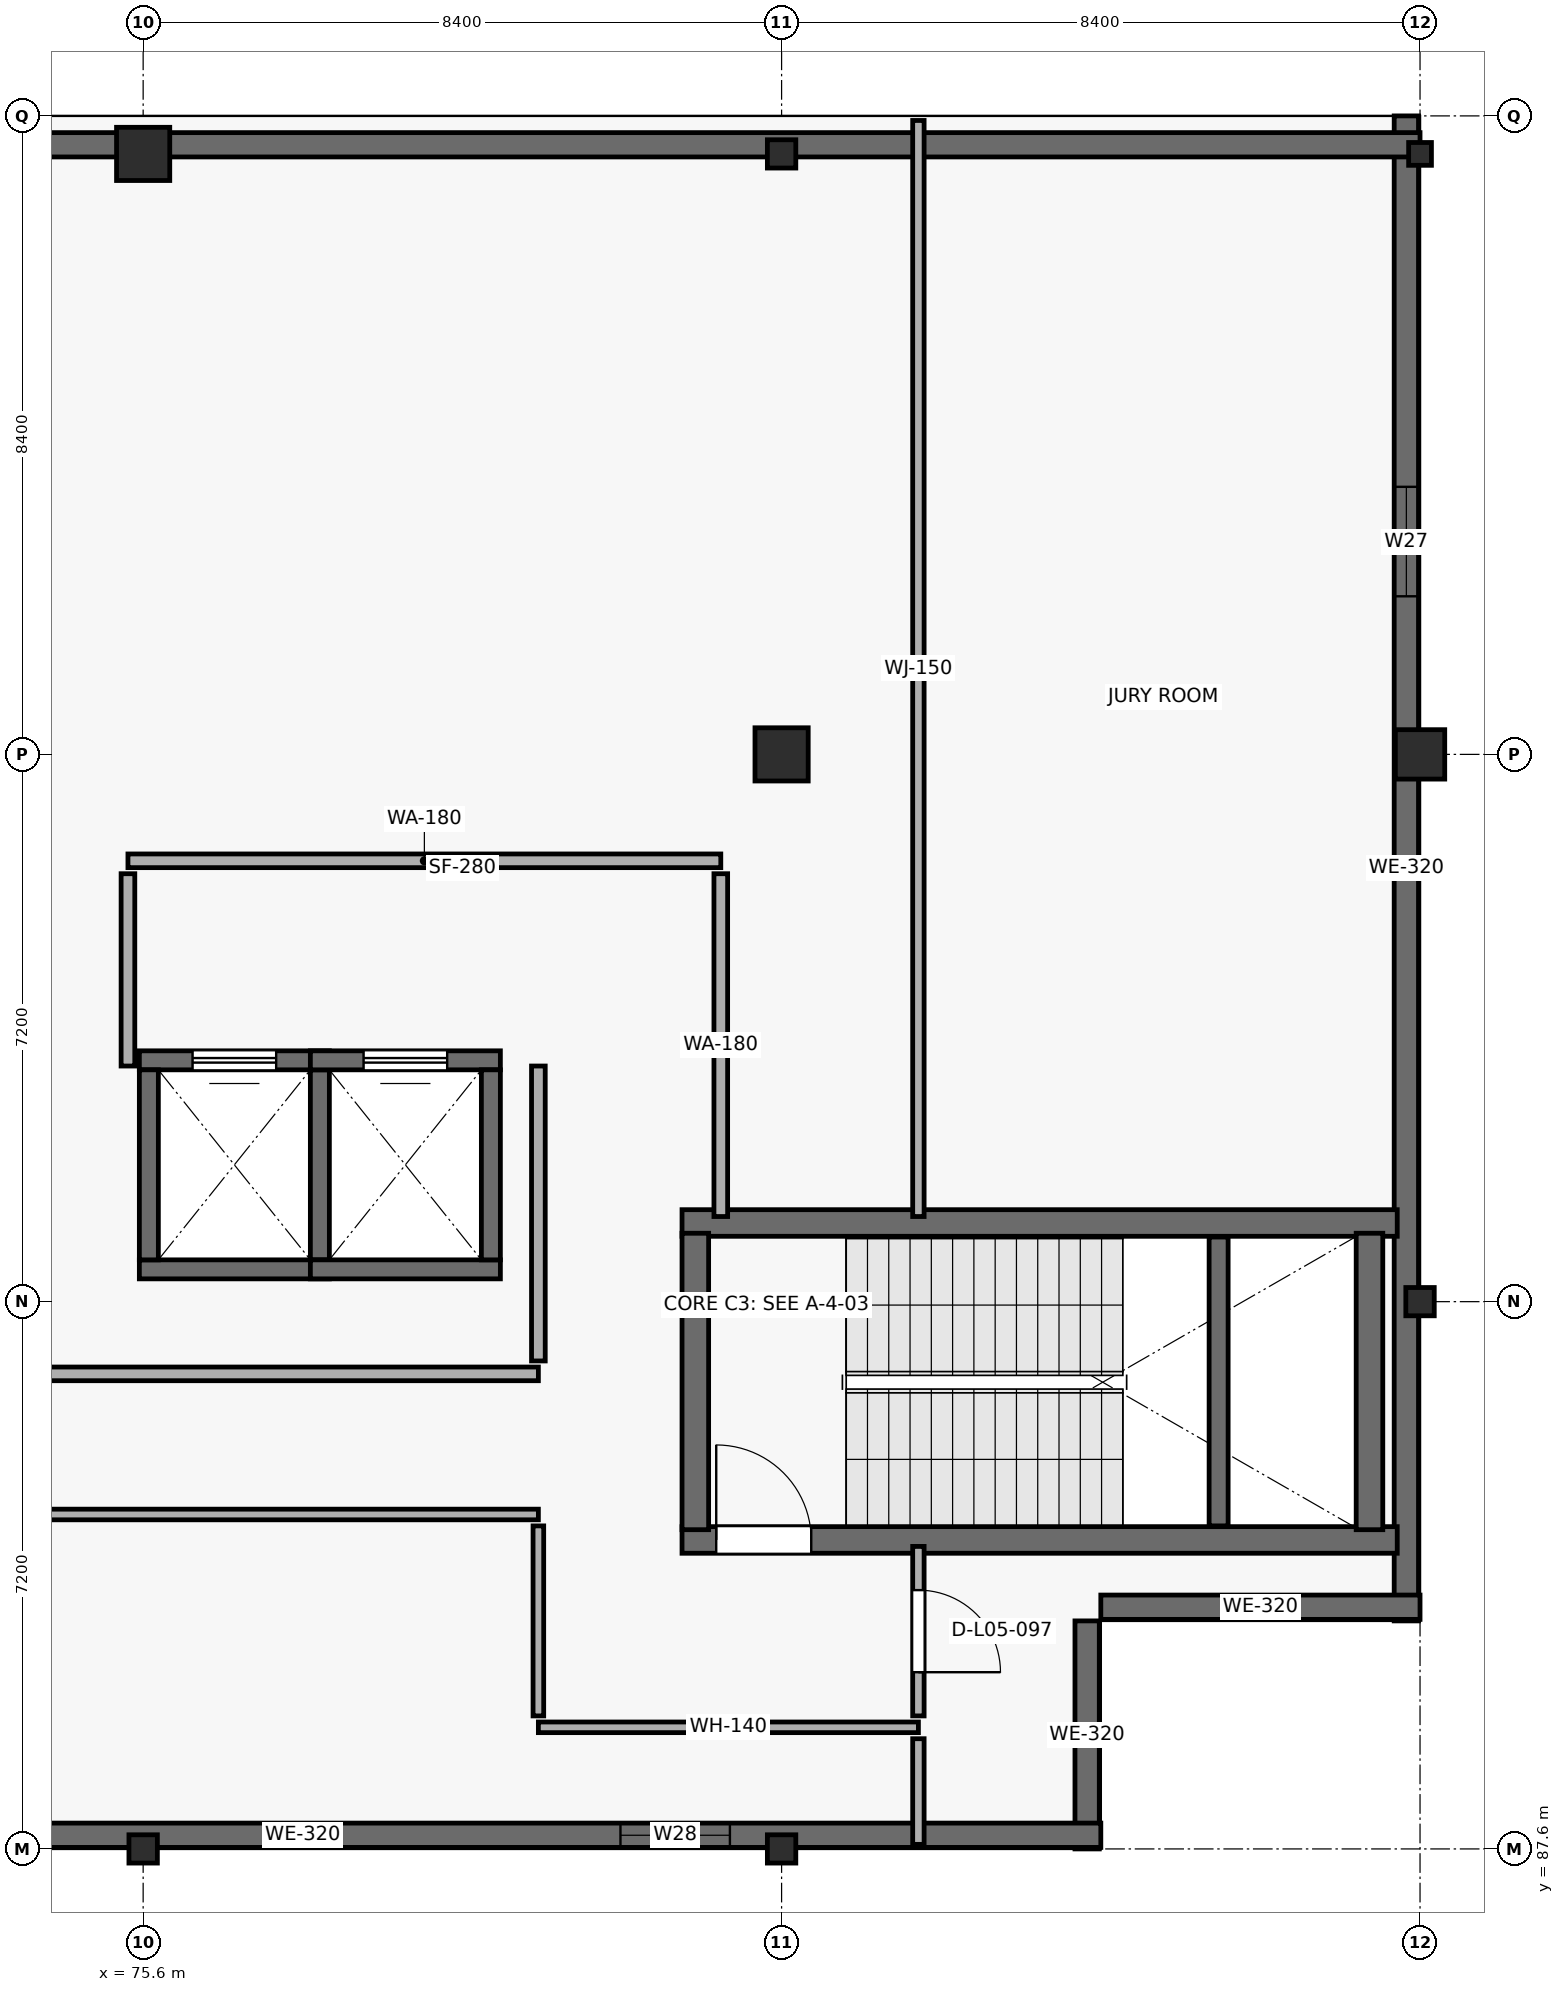
"""IFC4 building model, lengths in metres.
Left out: names, types, materials, properties, quantities, classifications, styles, units other than length and angle.
Written with IfcOpenShell. Run it as: python <this file> out.ifc"""

import sys

from ifc_helpers import new_model, si_unit, direction, frame, frame_2d, origin, origin_2d, place, context, subcontext, project, spatial, rectangle, hollow_rectangle, i_section, extrude, element, fill, save


model = new_model("IFC4")
c1 = context("Model", 3, precision=1e-05, world=origin(), true_north=direction((0.0, 1.0)))
c2 = subcontext(c1, "Body", "Model", "MODEL_VIEW")
j1 = project(units=[si_unit("LENGTHUNIT", "METRE"), si_unit("PLANEANGLEUNIT", "RADIAN")], contexts=[c1])
p1 = place(None, origin())
s1 = spatial("IfcSite", under=j1, at=p1, CompositionType="ELEMENT")
p2 = place(p1, origin())
s2 = spatial("IfcBuilding", under=s1, at=p2, CompositionType="ELEMENT")
p3 = place(p2, frame((0.0, 0.0, 20.4)))
s3 = spatial("IfcBuildingStorey", under=s2, at=p3, CompositionType="ELEMENT", Elevation=20.4)
p4 = place(p3, frame((75.6, 87.6, 0.0), z_axis=(0.0, 0.0, 1.0), x_axis=(1.0, 0.0, 0.0)))
e1 = element("IfcColumn", 1, at=p4, inside=s3, PredefinedType="COLUMN", context=c2, shape_type="SweptSolid", body=[
    extrude(i_section(OverallWidth=0.374, OverallDepth=0.372, WebThickness=0.016, FlangeThickness=0.026, at=origin_2d()), origin(), (0.0, 0.0, 1.0), 5.1),
])
p5 = place(p3, frame((75.6, 109.9, 0.0), z_axis=(0.0, 0.0, 1.0), x_axis=(1.0, 0.0, 0.0)))
e2 = element("IfcColumn", 2, at=p5, inside=s3, PredefinedType="COLUMN", context=c2, shape_type="SweptSolid", body=[
    extrude(rectangle(XDim=0.7, YDim=0.7, at=origin_2d()), origin(), (0.0, 0.0, 1.0), 5.1),
])
p6 = place(p3, frame((84.0, 87.6, 0.0), z_axis=(0.0, 0.0, 1.0), x_axis=(1.0, 0.0, 0.0)))
e3 = element("IfcColumn", 3, at=p6, inside=s3, PredefinedType="COLUMN", context=c2, shape_type="SweptSolid", body=[
    extrude(i_section(OverallWidth=0.374, OverallDepth=0.372, WebThickness=0.016, FlangeThickness=0.026, at=origin_2d()), origin(), (0.0, 0.0, 1.0), 5.1),
])
p7 = place(p3, frame((84.0, 102.0, 0.0), z_axis=(0.0, 0.0, 1.0), x_axis=(1.0, 0.0, 0.0)))
e4 = element("IfcColumn", 4, at=p7, inside=s3, PredefinedType="COLUMN", context=c2, shape_type="SweptSolid", body=[
    extrude(rectangle(XDim=0.7, YDim=0.7, at=origin_2d()), origin(), (0.0, 0.0, 1.0), 5.1),
])
for number, where, z_axis, x_axis in (
    (5, (84.0, 109.9, 0.0), (0.0, 0.0, 1.0), (1.0, 0.0, 0.0)),
    (6, (92.4, 94.8, 0.0), (0.0, 0.0, 1.0), (1.0, 0.0, 0.0)),
):
    element("IfcColumn", number, at=place(p3, frame(where, z_axis=z_axis, x_axis=x_axis)), inside=s3, PredefinedType="COLUMN", context=c2, shape_type="SweptSolid", body=[
        extrude(i_section(OverallWidth=0.374, OverallDepth=0.372, WebThickness=0.016, FlangeThickness=0.026, at=origin_2d()), origin(), (0.0, 0.0, 1.0), 5.1),
    ])
p8 = place(p3, frame((92.4, 102.0, 0.0), z_axis=(0.0, 0.0, 1.0), x_axis=(1.0, 0.0, 0.0)))
e7 = element("IfcColumn", 7, at=p8, inside=s3, PredefinedType="COLUMN", context=c2, shape_type="SweptSolid", body=[
    extrude(rectangle(XDim=0.65, YDim=0.65, at=origin_2d()), origin(), (0.0, 0.0, 1.0), 5.1),
])
p9 = place(p3, frame((92.4, 109.9, 0.0), z_axis=(0.0, 0.0, 1.0), x_axis=(1.0, 0.0, 0.0)))
e8 = element("IfcColumn", 8, at=p9, inside=s3, PredefinedType="COLUMN", context=c2, shape_type="SweptSolid", body=[
    extrude(hollow_rectangle(XDim=0.3, YDim=0.3, WallThickness=0.012, at=origin_2d()), origin(), (0.0, 0.0, 1.0), 5.1),
])
p10 = place(p3, frame((92.22, 110.4, 0.0), z_axis=(0.0, 0.0, 1.0), x_axis=(0.0, -1.0, 0.0)))
e9 = element("IfcWall", 9, at=p10, inside=s3, PredefinedType="SOLIDWALL", context=c2, shape_type="SweptSolid", body=[
    extrude(rectangle(XDim=19.8, YDim=0.32, at=frame_2d((9.9, 0.0))), origin(), (0.0, 0.0, 1.0), 4.84),
])
p11 = place(p10, frame((4.88, 0.0, 0.75)))
e10 = element("IfcOpeningElement", 10, at=p11, cuts=e9, PredefinedType="OPENING", context=c2, shape_type="SweptSolid", body=[
    extrude(rectangle(XDim=1.44, YDim=2.25, at=frame_2d((0.72, 1.125))), frame((0.0, 0.17, 0.0), z_axis=(0.0, -1.0, 0.0), x_axis=(1.0, 0.0, 0.0)), (0.0, 0.0, 1.0), 0.34),
])
p12 = place(p3, frame((92.4, 90.78, 0.0), z_axis=(0.0, 0.0, 1.0), x_axis=(-1.0, 0.0, 0.0)))
e11 = element("IfcWall", 11, at=p12, inside=s3, PredefinedType="SOLIDWALL", context=c2, shape_type="SweptSolid", body=[
    extrude(rectangle(XDim=4.2, YDim=0.32, at=frame_2d((2.1, 0.0))), origin(), (0.0, 0.0, 1.0), 4.84),
])
p13 = place(p3, frame((88.02, 90.6, 0.0), z_axis=(0.0, 0.0, 1.0), x_axis=(0.0, -1.0, 0.0)))
e12 = element("IfcWall", 12, at=p13, inside=s3, PredefinedType="SOLIDWALL", context=c2, shape_type="SweptSolid", body=[
    extrude(rectangle(XDim=3.0, YDim=0.32, at=frame_2d((1.5, 0.0))), origin(), (0.0, 0.0, 1.0), 4.84),
])
p14 = place(p3, frame((88.2, 87.78, 0.0), z_axis=(0.0, 0.0, 1.0), x_axis=(-1.0, 0.0, 0.0)))
e13 = element("IfcWall", 13, at=p14, inside=s3, PredefinedType="SOLIDWALL", context=c2, shape_type="SweptSolid", body=[
    extrude(rectangle(XDim=21.0, YDim=0.32, at=frame_2d((10.5, 0.0))), origin(), (0.0, 0.0, 1.0), 4.84),
])
p15 = place(p14, frame((4.88, 0.0, 0.75)))
e14 = element("IfcOpeningElement", 14, at=p15, cuts=e13, PredefinedType="OPENING", context=c2, shape_type="SweptSolid", body=[
    extrude(rectangle(XDim=1.44, YDim=2.65, at=frame_2d((0.72, 1.325))), frame((0.0, 0.17, 0.0), z_axis=(0.0, -1.0, 0.0), x_axis=(1.0, 0.0, 0.0)), (0.0, 0.0, 1.0), 0.34),
])
p16 = place(p14, frame((14.96, 0.0, 0.75)))
e15 = element("IfcOpeningElement", 15, at=p16, cuts=e13, PredefinedType="OPENING", context=c2, shape_type="SweptSolid", body=[
    extrude(rectangle(XDim=1.44, YDim=3.05, at=frame_2d((0.72, 1.525))), frame((0.0, 0.17, 0.0), z_axis=(0.0, -1.0, 0.0), x_axis=(1.0, 0.0, 0.0)), (0.0, 0.0, 1.0), 0.34),
])
p17 = place(p3, frame((67.2, 110.02, 0.0), z_axis=(0.0, 0.0, 1.0), x_axis=(1.0, 0.0, 0.0)))
e16 = element("IfcWall", 16, at=p17, inside=s3, PredefinedType="SOLIDWALL", context=c2, shape_type="SweptSolid", body=[
    extrude(rectangle(XDim=25.2, YDim=0.32, at=frame_2d((12.6, 0.0))), origin(), (0.0, 0.0, 1.0), 4.84),
])
p18 = place(p17, frame((4.79, 0.0, 0.75)))
e17 = element("IfcOpeningElement", 17, at=p18, cuts=e16, PredefinedType="OPENING", context=c2, shape_type="SweptSolid", body=[
    extrude(rectangle(XDim=1.62, YDim=3.05, at=frame_2d((0.81, 1.525))), frame((0.0, 0.17, 0.0), z_axis=(0.0, -1.0, 0.0), x_axis=(1.0, 0.0, 0.0)), (0.0, 0.0, 1.0), 0.34),
])
p19 = place(p3, frame((82.69, 91.665, 0.0), z_axis=(0.0, 0.0, 1.0), x_axis=(1.0, 0.0, 0.0)))
e18 = element("IfcWall", 18, at=p19, inside=s3, PredefinedType="SHEAR", context=c2, shape_type="SweptSolid", body=[
    extrude(rectangle(XDim=9.41, YDim=0.35, at=frame_2d((4.705, 0.0))), origin(), (0.0, 0.0, 1.0), 4.84),
])
p20 = place(p19, frame((0.45, 0.0, 0.0)))
e19 = element("IfcOpeningElement", 19, at=p20, cuts=e18, PredefinedType="OPENING", context=c2, shape_type="SweptSolid", body=[
    extrude(rectangle(XDim=1.25, YDim=2.2, at=frame_2d((0.625, 1.1))), frame((0.0, 0.185, 0.0), z_axis=(0.0, -1.0, 0.0), x_axis=(1.0, 0.0, 0.0)), (0.0, 0.0, 1.0), 0.37),
])
p21 = place(p3, frame((92.1, 95.835, 0.0), z_axis=(0.0, 0.0, 1.0), x_axis=(-1.0, 0.0, 0.0)))
e20 = element("IfcWall", 20, at=p21, inside=s3, PredefinedType="SHEAR", context=c2, shape_type="SweptSolid", body=[
    extrude(rectangle(XDim=9.41, YDim=0.35, at=frame_2d((4.705, 0.0))), origin(), (0.0, 0.0, 1.0), 4.84),
])
for number, where, z_axis, x_axis in (
    (21, (82.865, 91.8, 0.0), (0.0, 0.0, 1.0), (0.0, 1.0, 0.0)),
    (22, (91.735, 95.7, 0.0), (0.0, 0.0, 1.0), (0.0, -1.0, 0.0)),
):
    element("IfcWall", number, at=place(p3, frame(where, z_axis=z_axis, x_axis=x_axis)), inside=s3, PredefinedType="SHEAR", context=c2, shape_type="SweptSolid", body=[
        extrude(rectangle(XDim=3.9, YDim=0.35, at=frame_2d((1.95, 0.0))), origin(), (0.0, 0.0, 1.0), 4.84),
    ])
p22 = place(p3, frame((89.75, 91.85, 0.0), z_axis=(0.0, 0.0, 1.0), x_axis=(0.0, 1.0, 0.0)))
e23 = element("IfcWall", 23, at=p22, inside=s3, PredefinedType="SHEAR", context=c2, shape_type="SweptSolid", body=[
    extrude(rectangle(XDim=3.8, YDim=0.25, at=frame_2d((1.9, 0.0))), origin(), (0.0, 0.0, 1.0), 2.37),
])
p23 = place(p3, frame((75.55, 95.225, 0.0), z_axis=(0.0, 0.0, 1.0), x_axis=(1.0, 0.0, 0.0)))
e24 = element("IfcWall", 24, at=p23, inside=s3, PredefinedType="SHEAR", context=c2, shape_type="SweptSolid", body=[
    extrude(rectangle(XDim=2.5, YDim=0.25, at=frame_2d((1.25, 0.0))), origin(), (0.0, 0.0, 1.0), 4.84),
])
p24 = place(p3, frame((78.05, 97.975, 0.0), z_axis=(0.0, 0.0, 1.0), x_axis=(-1.0, 0.0, 0.0)))
e25 = element("IfcWall", 25, at=p24, inside=s3, PredefinedType="SHEAR", context=c2, shape_type="SweptSolid", body=[
    extrude(rectangle(XDim=2.5, YDim=0.25, at=frame_2d((1.25, 0.0))), origin(), (0.0, 0.0, 1.0), 4.84),
])
p25 = place(p24, frame((0.7, 0.0, 0.0)))
e26 = element("IfcOpeningElement", 26, at=p25, cuts=e25, PredefinedType="OPENING", context=c2, shape_type="SweptSolid", body=[
    extrude(rectangle(XDim=1.1, YDim=2.2, at=frame_2d((0.55, 1.1))), frame((0.0, 0.135, 0.0), z_axis=(0.0, -1.0, 0.0), x_axis=(1.0, 0.0, 0.0)), (0.0, 0.0, 1.0), 0.27),
])
for number, where, z_axis, x_axis in (
    (27, (75.675, 95.35, 0.0), (0.0, 0.0, 1.0), (0.0, 1.0, 0.0)),
    (28, (77.925, 97.85, 0.0), (0.0, 0.0, 1.0), (0.0, -1.0, 0.0)),
    (29, (77.8, 95.225, 0.0), (0.0, 0.0, 1.0), (1.0, 0.0, 0.0)),
):
    element("IfcWall", number, at=place(p3, frame(where, z_axis=z_axis, x_axis=x_axis)), inside=s3, PredefinedType="SHEAR", context=c2, shape_type="SweptSolid", body=[
        extrude(rectangle(XDim=2.5, YDim=0.25, at=frame_2d((1.25, 0.0))), origin(), (0.0, 0.0, 1.0), 4.84),
    ])
p26 = place(p3, frame((80.3, 97.975, 0.0), z_axis=(0.0, 0.0, 1.0), x_axis=(-1.0, 0.0, 0.0)))
e30 = element("IfcWall", 30, at=p26, inside=s3, PredefinedType="SHEAR", context=c2, shape_type="SweptSolid", body=[
    extrude(rectangle(XDim=2.5, YDim=0.25, at=frame_2d((1.25, 0.0))), origin(), (0.0, 0.0, 1.0), 4.84),
])
p27 = place(p26, frame((0.7, 0.0, 0.0)))
e31 = element("IfcOpeningElement", 31, at=p27, cuts=e30, PredefinedType="OPENING", context=c2, shape_type="SweptSolid", body=[
    extrude(rectangle(XDim=1.1, YDim=2.2, at=frame_2d((0.55, 1.1))), frame((0.0, 0.135, 0.0), z_axis=(0.0, -1.0, 0.0), x_axis=(1.0, 0.0, 0.0)), (0.0, 0.0, 1.0), 0.27),
])
p28 = place(p3, frame((80.175, 97.85, 0.0), z_axis=(0.0, 0.0, 1.0), x_axis=(0.0, -1.0, 0.0)))
e32 = element("IfcWall", 32, at=p28, inside=s3, PredefinedType="SHEAR", context=c2, shape_type="SweptSolid", body=[
    extrude(rectangle(XDim=2.5, YDim=0.25, at=frame_2d((1.25, 0.0))), origin(), (0.0, 0.0, 1.0), 4.84),
])
p29 = place(p3, frame((63.28, 92.0, 0.0), z_axis=(0.0, 0.0, 1.0), x_axis=(1.0, 0.0, 0.0)))
e33 = element("IfcWall", 33, at=p29, inside=s3, PredefinedType="PARTITIONING", context=c2, shape_type="SweptSolid", body=[
    extrude(rectangle(XDim=17.52, YDim=0.14, at=frame_2d((8.76, 0.0))), origin(), (0.0, 0.0, 1.0), 4.84),
])
p30 = place(p29, frame((8.24, 0.0, 0.0)))
e34 = element("IfcOpeningElement", 34, at=p30, cuts=e33, PredefinedType="OPENING", context=c2, shape_type="SweptSolid", body=[
    extrude(rectangle(XDim=1.04, YDim=2.26, at=frame_2d((0.52, 1.13))), frame((0.0, 0.08, 0.0), z_axis=(0.0, -1.0, 0.0), x_axis=(1.0, 0.0, 0.0)), (0.0, 0.0, 1.0), 0.16),
])
p31 = place(p3, frame((85.8, 95.92, 0.0), z_axis=(0.0, 0.0, 1.0), x_axis=(0.0, 1.0, 0.0)))
e35 = element("IfcWall", 35, at=p31, inside=s3, PredefinedType="PARTITIONING", context=c2, shape_type="SweptSolid", body=[
    extrude(rectangle(XDim=14.42, YDim=0.15, at=frame_2d((7.21, 0.0))), origin(), (0.0, 0.0, 1.0), 4.84),
])
p32 = place(p3, frame((80.8, 93.85, 0.0), z_axis=(0.0, 0.0, 1.0), x_axis=(-1.0, 0.0, 0.0)))
e36 = element("IfcWall", 36, at=p32, inside=s3, PredefinedType="PARTITIONING", context=c2, shape_type="SweptSolid", body=[
    extrude(rectangle(XDim=14.13, YDim=0.18, at=frame_2d((7.065, 0.0))), origin(), (0.0, 0.0, 1.0), 4.84),
])
p33 = place(p3, frame((83.2, 100.6, 0.0), z_axis=(0.0, 0.0, 1.0), x_axis=(-1.0, 0.0, 0.0)))
e37 = element("IfcWall", 37, at=p33, inside=s3, PredefinedType="PARTITIONING", context=c2, shape_type="SweptSolid", body=[
    extrude(rectangle(XDim=7.8, YDim=0.18, at=frame_2d((3.9, 0.0))), origin(), (0.0, 0.0, 1.0), 4.84),
])
p34 = place(p3, frame((80.8, 89.2, 0.0), z_axis=(0.0, 0.0, 1.0), x_axis=(1.0, 0.0, 0.0)))
e38 = element("IfcWall", 38, at=p34, inside=s3, PredefinedType="PARTITIONING", context=c2, shape_type="SweptSolid", body=[
    extrude(rectangle(XDim=5.0, YDim=0.14, at=frame_2d((2.5, 0.0))), origin(), (0.0, 0.0, 1.0), 4.84),
])
p35 = place(p3, frame((83.2, 95.92, 0.0), z_axis=(0.0, 0.0, 1.0), x_axis=(0.0, 1.0, 0.0)))
e39 = element("IfcWall", 39, at=p35, inside=s3, PredefinedType="PARTITIONING", context=c2, shape_type="SweptSolid", body=[
    extrude(rectangle(XDim=4.51, YDim=0.18, at=frame_2d((2.255, 0.0))), origin(), (0.0, 0.0, 1.0), 4.84),
])
p36 = place(p3, frame((80.8, 97.9, 0.0), z_axis=(0.0, 0.0, 1.0), x_axis=(0.0, -1.0, 0.0)))
e40 = element("IfcWall", 40, at=p36, inside=s3, PredefinedType="PARTITIONING", context=c2, shape_type="SweptSolid", body=[
    extrude(rectangle(XDim=3.88, YDim=0.18, at=frame_2d((1.94, 0.0))), origin(), (0.0, 0.0, 1.0), 4.84),
])
p37 = place(p3, frame((85.8, 87.66, 0.0), z_axis=(0.0, 0.0, 1.0), x_axis=(0.0, 1.0, 0.0)))
e41 = element("IfcWall", 41, at=p37, inside=s3, PredefinedType="PARTITIONING", context=c2, shape_type="SweptSolid", body=[
    extrude(rectangle(XDim=1.39, YDim=0.15, at=frame_2d((0.695, 0.0))), origin(), (0.0, 0.0, 1.0), 4.84),
])
p38 = place(p3, frame((85.8, 89.35, 0.0), z_axis=(0.0, 0.0, 1.0), x_axis=(0.0, 1.0, 0.0)))
e42 = element("IfcWall", 42, at=p38, inside=s3, PredefinedType="PARTITIONING", context=c2, shape_type="SweptSolid", body=[
    extrude(rectangle(XDim=2.23, YDim=0.15, at=frame_2d((1.115, 0.0))), origin(), (0.0, 0.0, 1.0), 4.84),
])
p39 = place(p38, frame((0.575, 0.0, 0.0)))
e43 = element("IfcOpeningElement", 43, at=p39, cuts=e42, PredefinedType="OPENING", context=c2, shape_type="SweptSolid", body=[
    extrude(rectangle(XDim=1.08, YDim=2.28, at=frame_2d((0.54, 1.14))), frame((0.0, 0.085, 0.0), z_axis=(0.0, -1.0, 0.0), x_axis=(1.0, 0.0, 0.0)), (0.0, 0.0, 1.0), 0.17),
])
p40 = place(p3, frame((80.8, 91.85, 0.0), z_axis=(0.0, 0.0, 1.0), x_axis=(0.0, -1.0, 0.0)))
e44 = element("IfcWall", 44, at=p40, inside=s3, PredefinedType="PARTITIONING", context=c2, shape_type="SweptSolid", body=[
    extrude(rectangle(XDim=2.5, YDim=0.14, at=frame_2d((1.25, 0.0))), origin(), (0.0, 0.0, 1.0), 4.84),
])
p41 = place(p3, frame((75.4, 100.43, 0.0), z_axis=(0.0, 0.0, 1.0), x_axis=(0.0, -1.0, 0.0)))
e45 = element("IfcWall", 45, at=p41, inside=s3, PredefinedType="PARTITIONING", context=c2, shape_type="SweptSolid", body=[
    extrude(rectangle(XDim=2.53, YDim=0.18, at=frame_2d((1.265, 0.0))), origin(), (0.0, 0.0, 1.0), 3.45),
])
p42 = place(p11, origin())
e46 = element("IfcWindow", 46, at=p42, inside=s3, PartitioningType="SINGLE_PANEL", PredefinedType="WINDOW", context=c2, shape_type="SweptSolid", body=[
    extrude(rectangle(XDim=1.44, YDim=2.25, at=frame_2d((0.72, 1.125))), frame((0.0, 0.03, 0.0), z_axis=(0.0, -1.0, 0.0), x_axis=(1.0, 0.0, 0.0)), (0.0, 0.0, 1.0), 0.06),
])
fill(e10, e46)
p43 = place(p15, origin())
e47 = element("IfcWindow", 47, at=p43, inside=s3, PartitioningType="SINGLE_PANEL", PredefinedType="WINDOW", context=c2, shape_type="SweptSolid", body=[
    extrude(rectangle(XDim=1.44, YDim=2.65, at=frame_2d((0.72, 1.325))), frame((0.0, 0.03, 0.0), z_axis=(0.0, -1.0, 0.0), x_axis=(1.0, 0.0, 0.0)), (0.0, 0.0, 1.0), 0.06),
])
fill(e14, e47)
p44 = place(p20, origin())
e48 = element("IfcDoor", 48, at=p44, inside=s3, OperationType="SINGLE_SWING_LEFT", PredefinedType="DOOR", context=c2, shape_type="SweptSolid", body=[
    extrude(rectangle(XDim=1.25, YDim=2.2, at=frame_2d((0.625, 1.1))), frame((0.0, 0.025, 0.0), z_axis=(0.0, -1.0, 0.0), x_axis=(1.0, 0.0, 0.0)), (0.0, 0.0, 1.0), 0.05),
])
fill(e19, e48)
p45 = place(p25, origin())
e49 = element("IfcDoor", 49, at=p45, inside=s3, OperationType="SLIDING_TO_RIGHT", PredefinedType="DOOR", context=c2, shape_type="SweptSolid", body=[
    extrude(rectangle(XDim=1.1, YDim=2.2, at=frame_2d((0.55, 1.1))), frame((0.0, 0.025, 0.0), z_axis=(0.0, -1.0, 0.0), x_axis=(1.0, 0.0, 0.0)), (0.0, 0.0, 1.0), 0.05),
])
fill(e26, e49)
p46 = place(p27, origin())
e50 = element("IfcDoor", 50, at=p46, inside=s3, OperationType="SLIDING_TO_RIGHT", PredefinedType="DOOR", context=c2, shape_type="SweptSolid", body=[
    extrude(rectangle(XDim=1.1, YDim=2.2, at=frame_2d((0.55, 1.1))), frame((0.0, 0.025, 0.0), z_axis=(0.0, -1.0, 0.0), x_axis=(1.0, 0.0, 0.0)), (0.0, 0.0, 1.0), 0.05),
])
fill(e31, e50)
p47 = place(p39, origin())
e51 = element("IfcDoor", 51, at=p47, inside=s3, OperationType="SINGLE_SWING_RIGHT", PredefinedType="DOOR", context=c2, shape_type="SweptSolid", body=[
    extrude(rectangle(XDim=1.08, YDim=2.28, at=frame_2d((0.54, 1.14))), frame((0.0, 0.025, 0.0), z_axis=(0.0, -1.0, 0.0), x_axis=(1.0, 0.0, 0.0)), (0.0, 0.0, 1.0), 0.05),
])
fill(e43, e51)
save(model, sys.argv[1])
